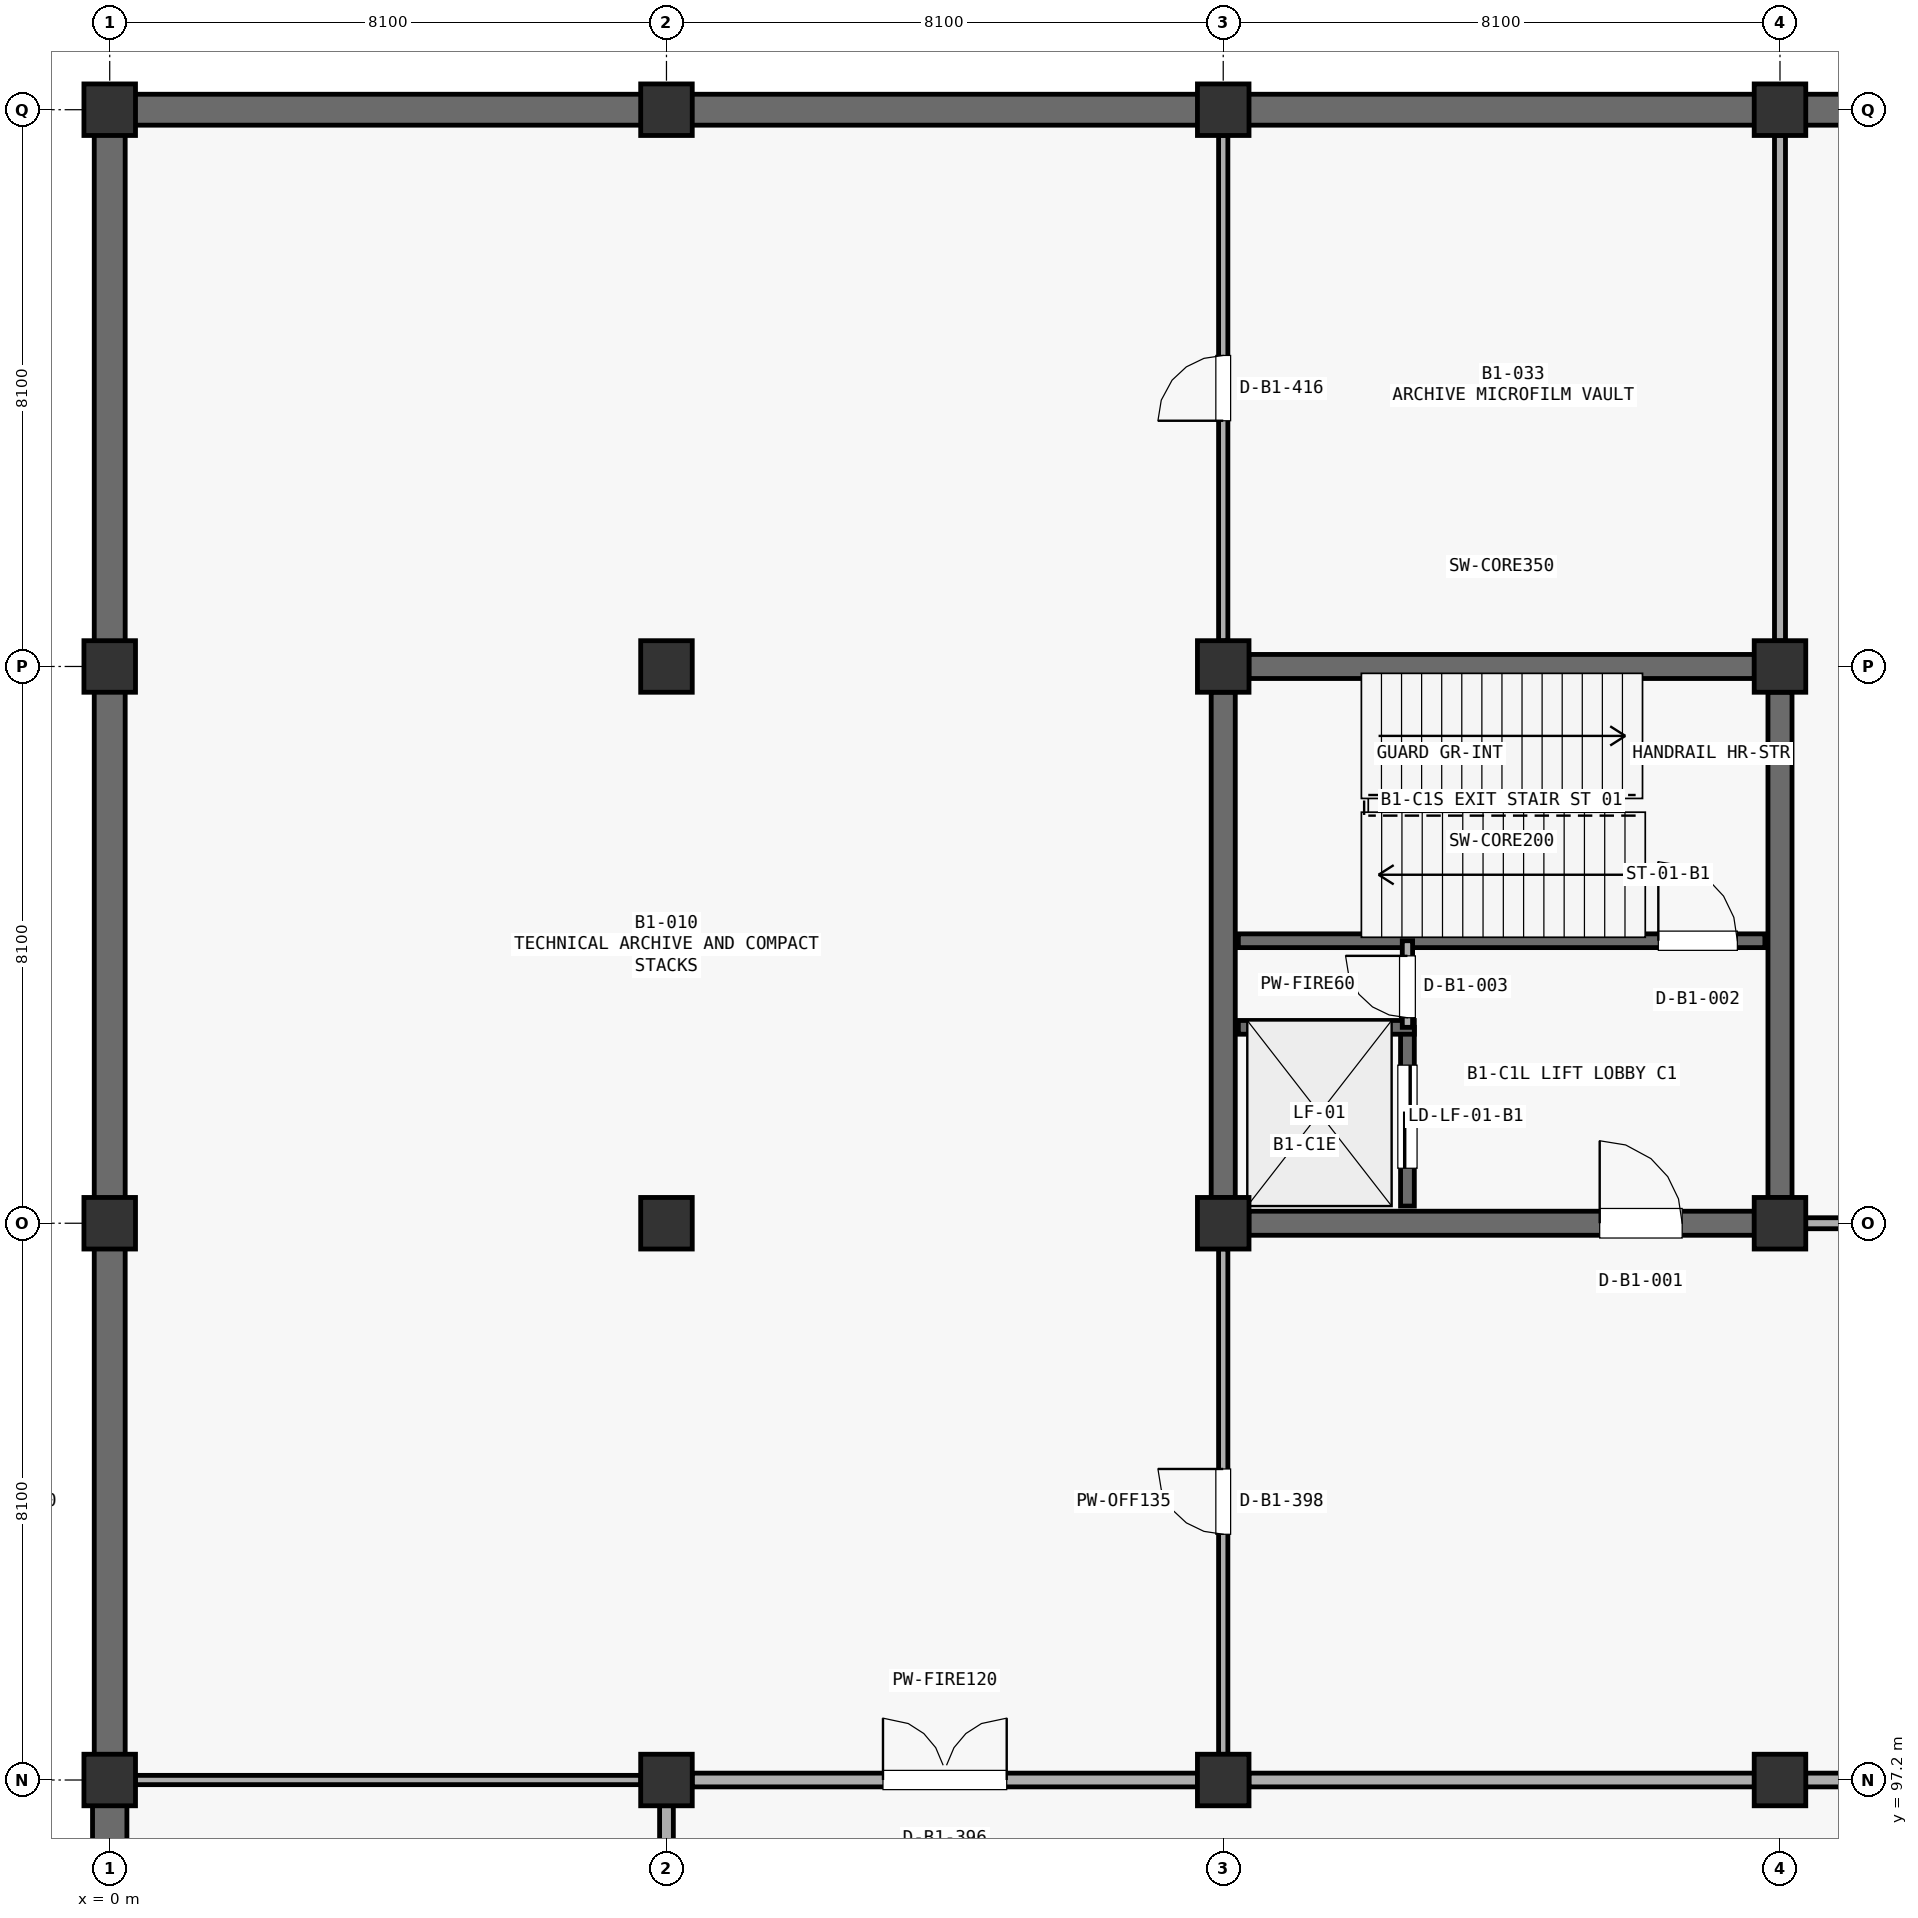
"""IFC4 building model, lengths in metres.
Left out: names, types, materials, properties, quantities, classifications, styles, units other than length and angle.
Written with IfcOpenShell. Run it as: python <this file> out.ifc"""

import sys

from ifc_helpers import new_model, si_unit, direction, frame, frame_2d, origin, origin_2d, place, context, subcontext, project, spatial, rectangle, extrude, element, fill, save


model = new_model("IFC4")
c1 = context("Model", 3, precision=1e-05, world=origin(), true_north=direction((0.0, 1.0)))
c2 = subcontext(c1, "Body", "Model", "MODEL_VIEW")
j1 = project(units=[si_unit("LENGTHUNIT", "METRE"), si_unit("PLANEANGLEUNIT", "RADIAN")], contexts=[c1])
p1 = place(None, origin())
s1 = spatial("IfcSite", under=j1, at=p1, CompositionType="ELEMENT")
p2 = place(p1, origin())
s2 = spatial("IfcBuilding", under=s1, at=p2, CompositionType="ELEMENT")
p3 = place(p2, frame((0.0, 0.0, -5.1)))
s3 = spatial("IfcBuildingStorey", under=s2, at=p3, CompositionType="ELEMENT", Elevation=-5.1)
for number, where, z_axis, x_axis in (
    (1, (0.0, 97.2, 0.0), (0.0, 0.0, 1.0), (1.0, 0.0, 0.0)),
    (2, (0.0, 105.3, 0.0), (0.0, 0.0, 1.0), (1.0, 0.0, 0.0)),
    (3, (0.0, 113.4, 0.0), (0.0, 0.0, 1.0), (1.0, 0.0, 0.0)),
    (4, (0.0, 121.5, 0.0), (0.0, 0.0, 1.0), (1.0, 0.0, 0.0)),
    (5, (8.1, 97.2, 0.0), (0.0, 0.0, 1.0), (1.0, 0.0, 0.0)),
    (6, (8.1, 105.3, 0.0), (0.0, 0.0, 1.0), (1.0, 0.0, 0.0)),
    (7, (8.1, 113.4, 0.0), (0.0, 0.0, 1.0), (1.0, 0.0, 0.0)),
    (8, (8.1, 121.5, 0.0), (0.0, 0.0, 1.0), (1.0, 0.0, 0.0)),
    (9, (16.2, 97.2, 0.0), (0.0, 0.0, 1.0), (1.0, 0.0, 0.0)),
    (10, (16.2, 105.3, 0.0), (0.0, 0.0, 1.0), (1.0, 0.0, 0.0)),
    (11, (16.2, 113.4, 0.0), (0.0, 0.0, 1.0), (1.0, 0.0, 0.0)),
    (12, (16.2, 121.5, 0.0), (0.0, 0.0, 1.0), (1.0, 0.0, 0.0)),
    (13, (24.3, 97.2, 0.0), (0.0, 0.0, 1.0), (1.0, 0.0, 0.0)),
    (14, (24.3, 105.3, 0.0), (0.0, 0.0, 1.0), (1.0, 0.0, 0.0)),
    (15, (24.3, 113.4, 0.0), (0.0, 0.0, 1.0), (1.0, 0.0, 0.0)),
    (16, (24.3, 121.5, 0.0), (0.0, 0.0, 1.0), (1.0, 0.0, 0.0)),
):
    element("IfcColumn", number, at=place(p3, frame(where, z_axis=z_axis, x_axis=x_axis)), inside=s3, PredefinedType="COLUMN", context=c2, shape_type="SweptSolid", body=[
        extrude(rectangle(XDim=0.75, YDim=0.75, at=origin_2d()), origin(), (0.0, 0.0, 1.0), 5.1),
    ])
p4 = place(p3, frame((0.0, 89.28, 0.0), z_axis=(0.0, 0.0, 1.0), x_axis=(0.0, 1.0, 0.0)))
e17 = element("IfcWall", 17, at=p4, inside=s3, PredefinedType="SOLIDWALL", context=c2, shape_type="SweptSolid", body=[
    extrude(rectangle(XDim=7.56, YDim=0.5, at=frame_2d((3.78, 0.0))), origin(), (0.0, 0.0, 1.0), 4.187),
])
p5 = place(p3, frame((0.0, 97.56, 0.0), z_axis=(0.0, 0.0, 1.0), x_axis=(0.0, 1.0, 0.0)))
e18 = element("IfcWall", 18, at=p5, inside=s3, PredefinedType="SOLIDWALL", context=c2, shape_type="SweptSolid", body=[
    extrude(rectangle(XDim=7.38, YDim=0.45, at=frame_2d((3.69, 0.0))), origin(), (0.0, 0.0, 1.0), 4.475),
])
p6 = place(p3, frame((0.0, 105.66, 0.0), z_axis=(0.0, 0.0, 1.0), x_axis=(0.0, 1.0, 0.0)))
e19 = element("IfcWall", 19, at=p6, inside=s3, PredefinedType="SOLIDWALL", context=c2, shape_type="SweptSolid", body=[
    extrude(rectangle(XDim=7.38, YDim=0.45, at=frame_2d((3.69, 0.0))), origin(), (0.0, 0.0, 1.0), 3.93),
])
p7 = place(p3, frame((0.0, 113.76, 0.0), z_axis=(0.0, 0.0, 1.0), x_axis=(0.0, 1.0, 0.0)))
e20 = element("IfcWall", 20, at=p7, inside=s3, PredefinedType="SOLIDWALL", context=c2, shape_type="SweptSolid", body=[
    extrude(rectangle(XDim=7.38, YDim=0.45, at=frame_2d((3.69, 0.0))), origin(), (0.0, 0.0, 1.0), 3.83),
])
p8 = place(p3, frame((0.36, 121.5, 0.0), z_axis=(0.0, 0.0, 1.0), x_axis=(1.0, 0.0, 0.0)))
e21 = element("IfcWall", 21, at=p8, inside=s3, PredefinedType="SOLIDWALL", context=c2, shape_type="SweptSolid", body=[
    extrude(rectangle(XDim=7.38, YDim=0.45, at=frame_2d((3.69, 0.0))), origin(), (0.0, 0.0, 1.0), 4.365),
])
p9 = place(p3, frame((8.46, 121.5, 0.0), z_axis=(0.0, 0.0, 1.0), x_axis=(1.0, 0.0, 0.0)))
e22 = element("IfcWall", 22, at=p9, inside=s3, PredefinedType="SOLIDWALL", context=c2, shape_type="SweptSolid", body=[
    extrude(rectangle(XDim=7.38, YDim=0.45, at=frame_2d((3.69, 0.0))), origin(), (0.0, 0.0, 1.0), 4.13),
])
p10 = place(p3, frame((16.56, 121.5, 0.0), z_axis=(0.0, 0.0, 1.0), x_axis=(1.0, 0.0, 0.0)))
e23 = element("IfcWall", 23, at=p10, inside=s3, PredefinedType="SOLIDWALL", context=c2, shape_type="SweptSolid", body=[
    extrude(rectangle(XDim=7.38, YDim=0.45, at=frame_2d((3.69, 0.0))), origin(), (0.0, 0.0, 1.0), 4.18),
])
p11 = place(p3, frame((24.66, 121.5, 0.0), z_axis=(0.0, 0.0, 1.0), x_axis=(1.0, 0.0, 0.0)))
e24 = element("IfcWall", 24, at=p11, inside=s3, PredefinedType="SOLIDWALL", context=c2, shape_type="SweptSolid", body=[
    extrude(rectangle(XDim=7.38, YDim=0.45, at=frame_2d((3.69, 0.0))), origin(), (0.0, 0.0, 1.0), 4.365),
])
for number, where, z_axis, x_axis in (
    (25, (16.573, 113.4, 0.0), (0.0, 0.0, 1.0), (1.0, 0.0, 0.0)),
    (26, (16.2, 105.673, 0.0), (0.0, 0.0, 1.0), (0.0, 1.0, 0.0)),
    (27, (24.3, 105.673, 0.0), (0.0, 0.0, 1.0), (0.0, 1.0, 0.0)),
):
    element("IfcWall", number, at=place(p3, frame(where, z_axis=z_axis, x_axis=x_axis)), inside=s3, PredefinedType="SHEAR", context=c2, shape_type="SweptSolid", body=[
        extrude(rectangle(XDim=7.354, YDim=0.35, at=frame_2d((3.677, 0.0))), origin(), (0.0, 0.0, 1.0), 4.782),
    ])
p12 = place(p3, frame((16.573, 105.3, 0.0), z_axis=(0.0, 0.0, 1.0), x_axis=(1.0, 0.0, 0.0)))
e28 = element("IfcWall", 28, at=p12, inside=s3, PredefinedType="SHEAR", context=c2, shape_type="SweptSolid", body=[
    extrude(rectangle(XDim=7.354, YDim=0.35, at=frame_2d((3.677, 0.0))), origin(), (0.0, 0.0, 1.0), 4.782),
])
p13 = place(p12, frame((5.104, 0.0, 0.0)))
e29 = element("IfcOpeningElement", 29, at=p13, cuts=e28, PredefinedType="OPENING", context=c2, shape_type="SweptSolid", body=[
    extrude(rectangle(XDim=1.2, YDim=2.2, at=frame_2d((0.6, 1.1))), frame((0.0, 0.185, 0.0), z_axis=(0.0, -1.0, 0.0), x_axis=(1.0, 0.0, 0.0)), (0.0, 0.0, 1.0), 0.37),
])
p14 = place(p3, frame((16.42, 109.41, 0.0), z_axis=(0.0, 0.0, 1.0), x_axis=(1.0, 0.0, 0.0)))
e30 = element("IfcWall", 30, at=p14, inside=s3, PredefinedType="SHEAR", context=c2, shape_type="SweptSolid", body=[
    extrude(rectangle(XDim=7.66, YDim=0.2, at=frame_2d((3.83, 0.0))), origin(), (0.0, 0.0, 1.0), 4.782),
])
p15 = place(p14, frame((6.11, 0.0, 0.0)))
e31 = element("IfcOpeningElement", 31, at=p15, cuts=e30, PredefinedType="OPENING", context=c2, shape_type="SweptSolid", body=[
    extrude(rectangle(XDim=1.15, YDim=2.2, at=frame_2d((0.575, 1.1))), frame((0.0, 0.11, 0.0), z_axis=(0.0, -1.0, 0.0), x_axis=(1.0, 0.0, 0.0)), (0.0, 0.0, 1.0), 0.22),
])
p16 = place(p3, frame((18.88, 105.55, 0.0), z_axis=(0.0, 0.0, 1.0), x_axis=(0.0, 1.0, 0.0)))
e32 = element("IfcWall", 32, at=p16, inside=s3, PredefinedType="SHEAR", context=c2, shape_type="SweptSolid", body=[
    extrude(rectangle(XDim=2.6, YDim=0.2, at=frame_2d((1.3, 0.0))), origin(), (0.0, 0.0, 1.0), 4.782),
])
p17 = place(p16, frame((0.55, 0.0, 0.0)))
e33 = element("IfcOpeningElement", 33, at=p17, cuts=e32, PredefinedType="OPENING", context=c2, shape_type="SweptSolid", body=[
    extrude(rectangle(XDim=1.5, YDim=2.3, at=frame_2d((0.75, 1.15))), frame((0.0, 0.11, 0.0), z_axis=(0.0, -1.0, 0.0), x_axis=(1.0, 0.0, 0.0)), (0.0, 0.0, 1.0), 0.22),
])
p18 = place(p3, frame((16.42, 108.15, 0.0), z_axis=(0.0, 0.0, 1.0), x_axis=(1.0, 0.0, 0.0)))
e34 = element("IfcWall", 34, at=p18, inside=s3, PredefinedType="SHEAR", context=c2, shape_type="SweptSolid", body=[
    extrude(rectangle(XDim=2.56, YDim=0.2, at=frame_2d((1.28, 0.0))), origin(), (0.0, 0.0, 1.0), 4.782),
])
p19 = place(p3, frame((18.88, 108.15, 0.0), z_axis=(0.0, 0.0, 1.0), x_axis=(0.0, 1.0, 0.0)))
e35 = element("IfcWall", 35, at=p19, inside=s3, PredefinedType="PARTITIONING", context=c2, shape_type="SweptSolid", body=[
    extrude(rectangle(XDim=1.26, YDim=0.15, at=frame_2d((0.63, 0.0))), origin(), (0.0, 0.0, 1.0), 4.782),
])
p20 = place(p19, frame((0.14, 0.0, 0.0)))
e36 = element("IfcOpeningElement", 36, at=p20, cuts=e35, PredefinedType="OPENING", context=c2, shape_type="SweptSolid", body=[
    extrude(rectangle(XDim=0.9, YDim=2.15, at=frame_2d((0.45, 1.075))), frame((0.0, 0.085, 0.0), z_axis=(0.0, -1.0, 0.0), x_axis=(1.0, 0.0, 0.0)), (0.0, 0.0, 1.0), 0.17),
])
p21 = place(p3, frame((8.473, 97.2, 0.0), z_axis=(0.0, 0.0, 1.0), x_axis=(1.0, 0.0, 0.0)))
e37 = element("IfcWall", 37, at=p21, inside=s3, PredefinedType="PARTITIONING", context=c2, shape_type="SweptSolid", body=[
    extrude(rectangle(XDim=7.354, YDim=0.2, at=frame_2d((3.677, 0.0))), origin(), (0.0, 0.0, 1.0), 3.872),
])
p22 = place(p21, frame((2.777, 0.0, 0.0)))
e38 = element("IfcOpeningElement", 38, at=p22, cuts=e37, PredefinedType="OPENING", context=c2, shape_type="SweptSolid", body=[
    extrude(rectangle(XDim=1.8, YDim=2.4, at=frame_2d((0.9, 1.2))), frame((0.0, 0.11, 0.0), z_axis=(0.0, -1.0, 0.0), x_axis=(1.0, 0.0, 0.0)), (0.0, 0.0, 1.0), 0.22),
])
p23 = place(p3, frame((16.573, 97.2, 0.0), z_axis=(0.0, 0.0, 1.0), x_axis=(1.0, 0.0, 0.0)))
e39 = element("IfcWall", 39, at=p23, inside=s3, PredefinedType="PARTITIONING", context=c2, shape_type="SweptSolid", body=[
    extrude(rectangle(XDim=7.354, YDim=0.2, at=frame_2d((3.677, 0.0))), origin(), (0.0, 0.0, 1.0), 3.772),
])
p24 = place(p3, frame((24.673, 97.2, 0.0), z_axis=(0.0, 0.0, 1.0), x_axis=(1.0, 0.0, 0.0)))
e40 = element("IfcWall", 40, at=p24, inside=s3, PredefinedType="PARTITIONING", context=c2, shape_type="SweptSolid", body=[
    extrude(rectangle(XDim=7.354, YDim=0.2, at=frame_2d((3.677, 0.0))), origin(), (0.0, 0.0, 1.0), 3.972),
])
p25 = place(p3, frame((8.1, 89.423, 0.0), z_axis=(0.0, 0.0, 1.0), x_axis=(0.0, 1.0, 0.0)))
e41 = element("IfcWall", 41, at=p25, inside=s3, PredefinedType="PARTITIONING", context=c2, shape_type="SweptSolid", body=[
    extrude(rectangle(XDim=7.404, YDim=0.2, at=frame_2d((3.702, 0.0))), origin(), (0.0, 0.0, 1.0), 4.259),
])
p26 = place(p3, frame((16.2, 97.573, 0.0), z_axis=(0.0, 0.0, 1.0), x_axis=(0.0, 1.0, 0.0)))
e42 = element("IfcWall", 42, at=p26, inside=s3, PredefinedType="PARTITIONING", context=c2, shape_type="SweptSolid", body=[
    extrude(rectangle(XDim=7.354, YDim=0.135, at=frame_2d((3.677, 0.0))), origin(), (0.0, 0.0, 1.0), 4.132),
])
p27 = place(p26, frame((3.202, 0.0, 0.0)))
e43 = element("IfcOpeningElement", 43, at=p27, cuts=e42, PredefinedType="OPENING", context=c2, shape_type="SweptSolid", body=[
    extrude(rectangle(XDim=0.95, YDim=2.15, at=frame_2d((0.475, 1.075))), frame((0.0, 0.078, 0.0), z_axis=(0.0, -1.0, 0.0), x_axis=(1.0, 0.0, 0.0)), (0.0, 0.0, 1.0), 0.155),
])
p28 = place(p3, frame((16.2, 113.773, 0.0), z_axis=(0.0, 0.0, 1.0), x_axis=(0.0, 1.0, 0.0)))
e44 = element("IfcWall", 44, at=p28, inside=s3, PredefinedType="PARTITIONING", context=c2, shape_type="SweptSolid", body=[
    extrude(rectangle(XDim=7.354, YDim=0.135, at=frame_2d((3.677, 0.0))), origin(), (0.0, 0.0, 1.0), 3.932),
])
p29 = place(p28, frame((3.202, 0.0, 0.0)))
e45 = element("IfcOpeningElement", 45, at=p29, cuts=e44, PredefinedType="OPENING", context=c2, shape_type="SweptSolid", body=[
    extrude(rectangle(XDim=0.95, YDim=2.15, at=frame_2d((0.475, 1.075))), frame((0.0, 0.078, 0.0), z_axis=(0.0, -1.0, 0.0), x_axis=(1.0, 0.0, 0.0)), (0.0, 0.0, 1.0), 0.155),
])
p30 = place(p3, frame((0.373, 97.2, 0.0), z_axis=(0.0, 0.0, 1.0), x_axis=(1.0, 0.0, 0.0)))
e46 = element("IfcWall", 46, at=p30, inside=s3, PredefinedType="PARTITIONING", context=c2, shape_type="SweptSolid", body=[
    extrude(rectangle(XDim=7.354, YDim=0.135, at=frame_2d((3.677, 0.0))), origin(), (0.0, 0.0, 1.0), 4.122),
])
p31 = place(p3, frame((24.673, 105.3, 0.0), z_axis=(0.0, 0.0, 1.0), x_axis=(1.0, 0.0, 0.0)))
e47 = element("IfcWall", 47, at=p31, inside=s3, PredefinedType="PARTITIONING", context=c2, shape_type="SweptSolid", body=[
    extrude(rectangle(XDim=7.354, YDim=0.16, at=frame_2d((3.677, 0.0))), origin(), (0.0, 0.0, 1.0), 4.132),
])
p32 = place(p31, frame((3.077, 0.0, 0.0)))
e48 = element("IfcOpeningElement", 48, at=p32, cuts=e47, PredefinedType="OPENING", context=c2, shape_type="SweptSolid", body=[
    extrude(rectangle(XDim=1.2, YDim=2.2, at=frame_2d((0.6, 1.1))), frame((0.0, 0.09, 0.0), z_axis=(0.0, -1.0, 0.0), x_axis=(1.0, 0.0, 0.0)), (0.0, 0.0, 1.0), 0.18),
])
p33 = place(p3, frame((24.3, 113.773, 0.0), z_axis=(0.0, 0.0, 1.0), x_axis=(0.0, 1.0, 0.0)))
e49 = element("IfcWall", 49, at=p33, inside=s3, PredefinedType="PARTITIONING", context=c2, shape_type="SweptSolid", body=[
    extrude(rectangle(XDim=7.354, YDim=0.16, at=frame_2d((3.677, 0.0))), origin(), (0.0, 0.0, 1.0), 4.032),
])
p34 = place(p13, origin())
e50 = element("IfcDoor", 50, at=p34, inside=s3, OperationType="SINGLE_SWING_LEFT", PredefinedType="DOOR", context=c2, shape_type="SweptSolid", body=[
    extrude(rectangle(XDim=1.2, YDim=2.2, at=frame_2d((0.6, 1.1))), frame((0.0, 0.025, 0.0), z_axis=(0.0, -1.0, 0.0), x_axis=(1.0, 0.0, 0.0)), (0.0, 0.0, 1.0), 0.05),
])
fill(e29, e50)
p35 = place(p15, origin())
e51 = element("IfcDoor", 51, at=p35, inside=s3, OperationType="SINGLE_SWING_LEFT", PredefinedType="DOOR", context=c2, shape_type="SweptSolid", body=[
    extrude(rectangle(XDim=1.15, YDim=2.2, at=frame_2d((0.575, 1.1))), frame((0.0, 0.025, 0.0), z_axis=(0.0, -1.0, 0.0), x_axis=(1.0, 0.0, 0.0)), (0.0, 0.0, 1.0), 0.05),
])
fill(e31, e51)
p36 = place(p17, origin())
e52 = element("IfcDoor", 52, at=p36, inside=s3, OperationType="SLIDING_TO_LEFT", PredefinedType="DOOR", context=c2, shape_type="SweptSolid", body=[
    extrude(rectangle(XDim=1.5, YDim=2.3, at=frame_2d((0.75, 1.15))), frame((0.0, 0.025, 0.0), z_axis=(0.0, -1.0, 0.0), x_axis=(1.0, 0.0, 0.0)), (0.0, 0.0, 1.0), 0.05),
])
fill(e33, e52)
p37 = place(p20, origin())
e53 = element("IfcDoor", 53, at=p37, inside=s3, OperationType="SINGLE_SWING_RIGHT", PredefinedType="DOOR", context=c2, shape_type="SweptSolid", body=[
    extrude(rectangle(XDim=0.9, YDim=2.15, at=frame_2d((0.45, 1.075))), frame((0.0, 0.025, 0.0), z_axis=(0.0, -1.0, 0.0), x_axis=(1.0, 0.0, 0.0)), (0.0, 0.0, 1.0), 0.05),
])
fill(e36, e53)
p38 = place(p22, origin())
e54 = element("IfcDoor", 54, at=p38, inside=s3, OperationType="DOUBLE_SWING_LEFT", PredefinedType="DOOR", context=c2, shape_type="SweptSolid", body=[
    extrude(rectangle(XDim=1.8, YDim=2.4, at=frame_2d((0.9, 1.2))), frame((0.0, 0.025, 0.0), z_axis=(0.0, -1.0, 0.0), x_axis=(1.0, 0.0, 0.0)), (0.0, 0.0, 1.0), 0.05),
])
fill(e38, e54)
p39 = place(p27, origin())
e55 = element("IfcDoor", 55, at=p39, inside=s3, OperationType="SINGLE_SWING_RIGHT", PredefinedType="DOOR", context=c2, shape_type="SweptSolid", body=[
    extrude(rectangle(XDim=0.95, YDim=2.15, at=frame_2d((0.475, 1.075))), frame((0.0, 0.025, 0.0), z_axis=(0.0, -1.0, 0.0), x_axis=(1.0, 0.0, 0.0)), (0.0, 0.0, 1.0), 0.05),
])
fill(e43, e55)
p40 = place(p29, origin())
e56 = element("IfcDoor", 56, at=p40, inside=s3, OperationType="SINGLE_SWING_LEFT", PredefinedType="DOOR", context=c2, shape_type="SweptSolid", body=[
    extrude(rectangle(XDim=0.95, YDim=2.15, at=frame_2d((0.475, 1.075))), frame((0.0, 0.025, 0.0), z_axis=(0.0, -1.0, 0.0), x_axis=(1.0, 0.0, 0.0)), (0.0, 0.0, 1.0), 0.05),
])
fill(e45, e56)
save(model, sys.argv[1])
